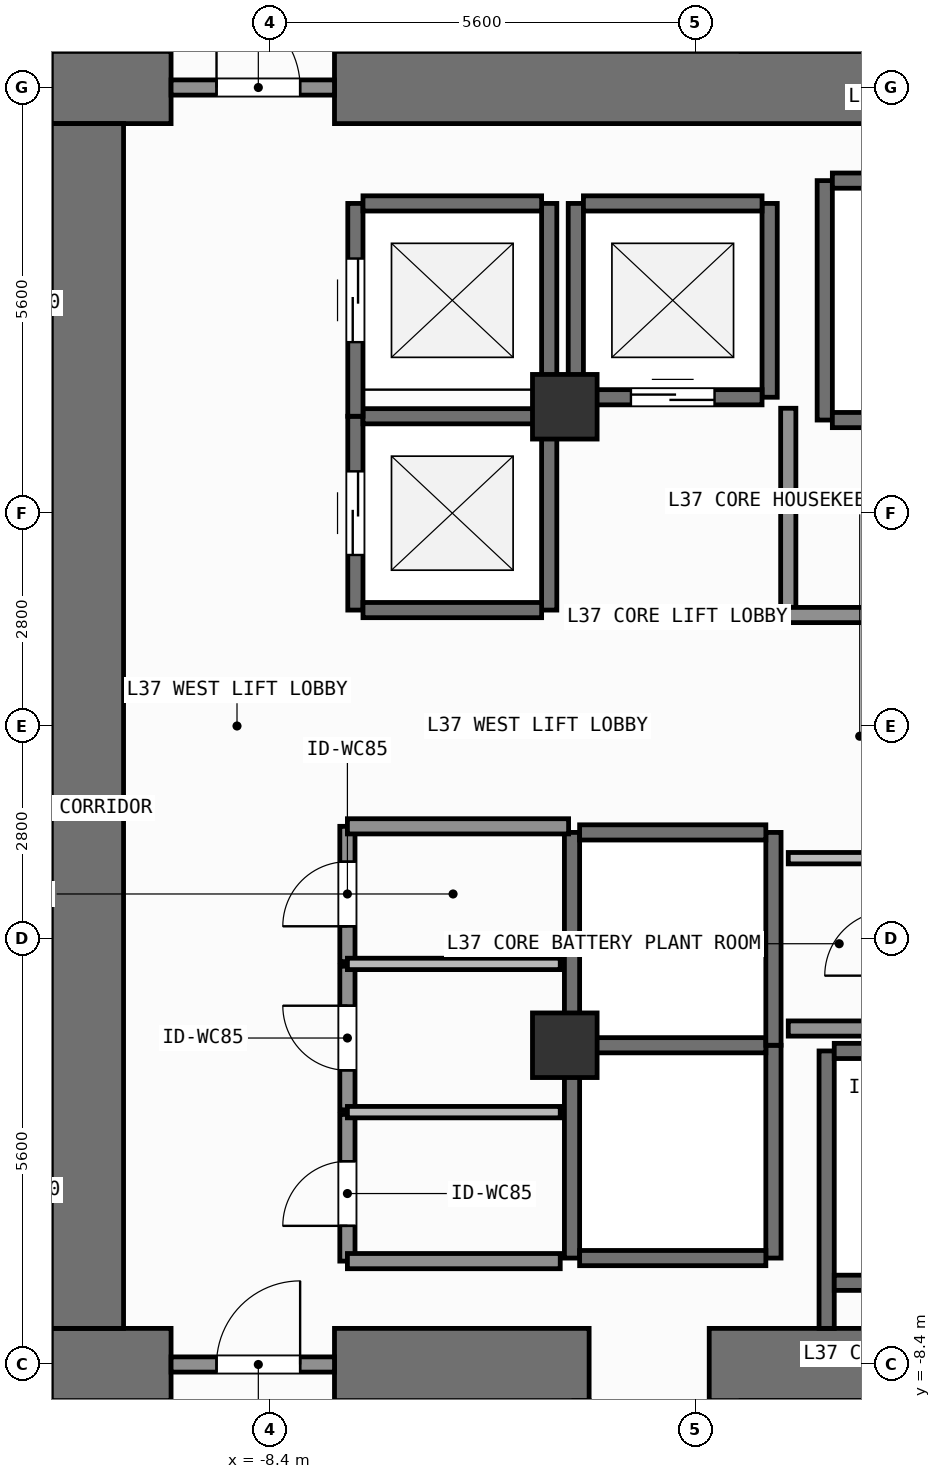
"""IFC4 building model, lengths in metres.
Left out: names, types, materials, properties, quantities, classifications, styles, units other than length and angle.
Written with IfcOpenShell. Run it as: python <this file> out.ifc"""

import sys

from ifc_helpers import new_model, si_unit, direction, frame, frame_2d, origin, origin_2d, place, context, subcontext, project, spatial, rectangle, extrude, element, fill, save


model = new_model("IFC4")
c1 = context("Model", 3, precision=1e-05, world=origin(), true_north=direction((0.0, 1.0)))
c2 = subcontext(c1, "Body", "Model", "MODEL_VIEW")
j1 = project(units=[si_unit("LENGTHUNIT", "METRE"), si_unit("PLANEANGLEUNIT", "RADIAN")], contexts=[c1])
p1 = place(None, origin())
s1 = spatial("IfcSite", under=j1, at=p1, CompositionType="ELEMENT")
p2 = place(p1, origin())
s2 = spatial("IfcBuilding", under=s1, at=p2, CompositionType="ELEMENT")
p3 = place(p2, frame((0.0, 0.0, 148.5)))
s3 = spatial("IfcBuildingStorey", under=s2, at=p3, CompositionType="ELEMENT", Elevation=148.5)
p4 = place(p3, frame((-11.275, -8.4, 0.0), z_axis=(0.0, 0.0, 1.0), x_axis=(1.0, 0.0, 0.0)))
e1 = element("IfcWall", 1, at=p4, inside=s3, PredefinedType="SHEAR", context=c2, shape_type="SweptSolid", body=[
    extrude(rectangle(XDim=1.575, YDim=0.95, at=frame_2d((0.788, 0.0))), origin(), (0.0, 0.0, 1.0), 3.9),
])
p5 = place(p3, frame((-7.55, -8.4, 0.0), z_axis=(0.0, 0.0, 1.0), x_axis=(1.0, 0.0, 0.0)))
e2 = element("IfcWall", 2, at=p5, inside=s3, PredefinedType="SHEAR", context=c2, shape_type="SweptSolid", body=[
    extrude(rectangle(XDim=3.35, YDim=0.95, at=frame_2d((1.675, 0.0))), origin(), (0.0, 0.0, 1.0), 3.9),
])
p6 = place(p3, frame((-2.62, -8.4, 0.0), z_axis=(0.0, 0.0, 1.0), x_axis=(1.0, 0.0, 0.0)))
e3 = element("IfcWall", 3, at=p6, inside=s3, PredefinedType="SHEAR", context=c2, shape_type="SweptSolid", body=[
    extrude(rectangle(XDim=7.27, YDim=0.95, at=frame_2d((3.635, 0.0))), origin(), (0.0, 0.0, 1.0), 3.9),
])
p7 = place(p3, frame((-11.275, 8.4, 0.0), z_axis=(0.0, 0.0, 1.0), x_axis=(1.0, 0.0, 0.0)))
e4 = element("IfcWall", 4, at=p7, inside=s3, PredefinedType="SHEAR", context=c2, shape_type="SweptSolid", body=[
    extrude(rectangle(XDim=1.575, YDim=0.95, at=frame_2d((0.788, 0.0))), origin(), (0.0, 0.0, 1.0), 3.9),
])
p8 = place(p3, frame((-7.55, 8.4, 0.0), z_axis=(0.0, 0.0, 1.0), x_axis=(1.0, 0.0, 0.0)))
e5 = element("IfcWall", 5, at=p8, inside=s3, PredefinedType="SHEAR", context=c2, shape_type="SweptSolid", body=[
    extrude(rectangle(XDim=16.425, YDim=0.95, at=frame_2d((8.212, 0.0))), origin(), (0.0, 0.0, 1.0), 3.9),
])
p9 = place(p3, frame((-10.8, -7.925, 0.0), z_axis=(0.0, 0.0, 1.0), x_axis=(0.0, 1.0, 0.0)))
e6 = element("IfcWall", 6, at=p9, inside=s3, PredefinedType="SHEAR", context=c2, shape_type="SweptSolid", body=[
    extrude(rectangle(XDim=15.85, YDim=0.95, at=frame_2d((7.925, 0.0))), origin(), (0.0, 0.0, 1.0), 3.9),
])
for number, where, z_axis, x_axis in (
    (7, (-4.52, -4.2, 0.0), (0.0, 0.0, 1.0), (1.0, 0.0, 0.0)),
    (8, (-4.52, 4.2, 0.0), (0.0, 0.0, 1.0), (1.0, 0.0, 0.0)),
):
    element("IfcColumn", number, at=place(p3, frame(where, z_axis=z_axis, x_axis=x_axis)), inside=s3, PredefinedType="COLUMN", context=c2, shape_type="SweptSolid", body=[
        extrude(rectangle(XDim=0.85, YDim=0.85, at=origin_2d()), origin(), (0.0, 0.0, 1.0), 3.9),
    ])
p10 = place(p3, frame((-7.275, 1.525, 0.0), z_axis=(0.0, 0.0, 1.0), x_axis=(0.0, 1.0, 0.0)))
e9 = element("IfcWall", 9, at=p10, inside=s3, PredefinedType="SHEAR", context=c2, shape_type="SweptSolid", body=[
    extrude(rectangle(XDim=2.55, YDim=0.2, at=frame_2d((1.275, 0.0))), origin(), (0.0, 0.0, 1.0), 3.68),
])
p11 = place(p10, frame((0.725, 0.0, 0.0)))
e10 = element("IfcOpeningElement", 10, at=p11, cuts=e9, PredefinedType="OPENING", context=c2, shape_type="SweptSolid", body=[
    extrude(rectangle(XDim=1.1, YDim=2.2, at=frame_2d((0.55, 1.1))), frame((0.0, 0.11, 0.0), z_axis=(0.0, -1.0, 0.0), x_axis=(1.0, 0.0, 0.0)), (0.0, 0.0, 1.0), 0.22),
])
p12 = place(p3, frame((-4.725, 1.525, 0.0), z_axis=(0.0, 0.0, 1.0), x_axis=(0.0, 1.0, 0.0)))
e11 = element("IfcWall", 11, at=p12, inside=s3, PredefinedType="SHEAR", context=c2, shape_type="SweptSolid", body=[
    extrude(rectangle(XDim=2.55, YDim=0.2, at=frame_2d((1.275, 0.0))), origin(), (0.0, 0.0, 1.0), 3.68),
])
for number, where, z_axis, x_axis in (
    (12, (-7.175, 1.525, 0.0), (0.0, 0.0, 1.0), (1.0, 0.0, 0.0)),
    (13, (-7.175, 4.075, 0.0), (0.0, 0.0, 1.0), (1.0, 0.0, 0.0)),
):
    element("IfcWall", number, at=place(p3, frame(where, z_axis=z_axis, x_axis=x_axis)), inside=s3, PredefinedType="SHEAR", context=c2, shape_type="SweptSolid", body=[
        extrude(rectangle(XDim=2.35, YDim=0.2, at=frame_2d((1.175, 0.0))), origin(), (0.0, 0.0, 1.0), 3.68),
    ])
p13 = place(p3, frame((-7.275, 4.075, 0.0), z_axis=(0.0, 0.0, 1.0), x_axis=(0.0, 1.0, 0.0)))
e14 = element("IfcWall", 14, at=p13, inside=s3, PredefinedType="SHEAR", context=c2, shape_type="SweptSolid", body=[
    extrude(rectangle(XDim=2.8, YDim=0.2, at=frame_2d((1.4, 0.0))), origin(), (0.0, 0.0, 1.0), 3.68),
])
p14 = place(p13, frame((0.975, 0.0, 0.0)))
e15 = element("IfcOpeningElement", 15, at=p14, cuts=e14, PredefinedType="OPENING", context=c2, shape_type="SweptSolid", body=[
    extrude(rectangle(XDim=1.1, YDim=2.2, at=frame_2d((0.55, 1.1))), frame((0.0, 0.11, 0.0), z_axis=(0.0, -1.0, 0.0), x_axis=(1.0, 0.0, 0.0)), (0.0, 0.0, 1.0), 0.22),
])
p15 = place(p3, frame((-4.725, 4.075, 0.0), z_axis=(0.0, 0.0, 1.0), x_axis=(0.0, 1.0, 0.0)))
e16 = element("IfcWall", 16, at=p15, inside=s3, PredefinedType="SHEAR", context=c2, shape_type="SweptSolid", body=[
    extrude(rectangle(XDim=2.8, YDim=0.2, at=frame_2d((1.4, 0.0))), origin(), (0.0, 0.0, 1.0), 3.68),
])
p16 = place(p3, frame((-7.175, 6.875, 0.0), z_axis=(0.0, 0.0, 1.0), x_axis=(1.0, 0.0, 0.0)))
e17 = element("IfcWall", 17, at=p16, inside=s3, PredefinedType="SHEAR", context=c2, shape_type="SweptSolid", body=[
    extrude(rectangle(XDim=2.35, YDim=0.2, at=frame_2d((1.175, 0.0))), origin(), (0.0, 0.0, 1.0), 3.68),
])
for number, where, z_axis, x_axis in (
    (18, (-4.375, 4.325, 0.0), (0.0, 0.0, 1.0), (0.0, 1.0, 0.0)),
    (19, (-1.825, 4.325, 0.0), (0.0, 0.0, 1.0), (0.0, 1.0, 0.0)),
):
    element("IfcWall", number, at=place(p3, frame(where, z_axis=z_axis, x_axis=x_axis)), inside=s3, PredefinedType="SHEAR", context=c2, shape_type="SweptSolid", body=[
        extrude(rectangle(XDim=2.55, YDim=0.2, at=frame_2d((1.275, 0.0))), origin(), (0.0, 0.0, 1.0), 3.68),
    ])
p17 = place(p3, frame((-4.275, 4.325, 0.0), z_axis=(0.0, 0.0, 1.0), x_axis=(1.0, 0.0, 0.0)))
e20 = element("IfcWall", 20, at=p17, inside=s3, PredefinedType="SHEAR", context=c2, shape_type="SweptSolid", body=[
    extrude(rectangle(XDim=2.35, YDim=0.2, at=frame_2d((1.175, 0.0))), origin(), (0.0, 0.0, 1.0), 3.68),
])
p18 = place(p17, frame((0.625, 0.0, 0.0)))
e21 = element("IfcOpeningElement", 21, at=p18, cuts=e20, PredefinedType="OPENING", context=c2, shape_type="SweptSolid", body=[
    extrude(rectangle(XDim=1.1, YDim=2.2, at=frame_2d((0.55, 1.1))), frame((0.0, 0.11, 0.0), z_axis=(0.0, -1.0, 0.0), x_axis=(1.0, 0.0, 0.0)), (0.0, 0.0, 1.0), 0.22),
])
p19 = place(p3, frame((-4.275, 6.875, 0.0), z_axis=(0.0, 0.0, 1.0), x_axis=(1.0, 0.0, 0.0)))
e22 = element("IfcWall", 22, at=p19, inside=s3, PredefinedType="SHEAR", context=c2, shape_type="SweptSolid", body=[
    extrude(rectangle(XDim=2.35, YDim=0.2, at=frame_2d((1.175, 0.0))), origin(), (0.0, 0.0, 1.0), 3.68),
])
for number, where, z_axis, x_axis in (
    (23, (-4.425, -7.0, 0.0), (0.0, 0.0, 1.0), (0.0, 1.0, 0.0)),
    (24, (-1.775, -7.0, 0.0), (0.0, 0.0, 1.0), (0.0, 1.0, 0.0)),
):
    element("IfcWall", number, at=place(p3, frame(where, z_axis=z_axis, x_axis=x_axis)), inside=s3, PredefinedType="SHEAR", context=c2, shape_type="SweptSolid", body=[
        extrude(rectangle(XDim=2.8, YDim=0.2, at=frame_2d((1.4, 0.0))), origin(), (0.0, 0.0, 1.0), 3.68),
    ])
for number, where, z_axis, x_axis in (
    (25, (-4.325, -7.0, 0.0), (0.0, 0.0, 1.0), (1.0, 0.0, 0.0)),
    (26, (-4.325, -4.2, 0.0), (0.0, 0.0, 1.0), (1.0, 0.0, 0.0)),
):
    element("IfcWall", number, at=place(p3, frame(where, z_axis=z_axis, x_axis=x_axis)), inside=s3, PredefinedType="SHEAR", context=c2, shape_type="SweptSolid", body=[
        extrude(rectangle(XDim=2.45, YDim=0.2, at=frame_2d((1.225, 0.0))), origin(), (0.0, 0.0, 1.0), 3.68),
    ])
for number, where, z_axis, x_axis in (
    (27, (-4.425, -4.2, 0.0), (0.0, 0.0, 1.0), (0.0, 1.0, 0.0)),
    (28, (-1.775, -4.2, 0.0), (0.0, 0.0, 1.0), (0.0, 1.0, 0.0)),
):
    element("IfcWall", number, at=place(p3, frame(where, z_axis=z_axis, x_axis=x_axis)), inside=s3, PredefinedType="SHEAR", context=c2, shape_type="SweptSolid", body=[
        extrude(rectangle(XDim=2.8, YDim=0.2, at=frame_2d((1.4, 0.0))), origin(), (0.0, 0.0, 1.0), 3.68),
    ])
p20 = place(p3, frame((-4.325, -1.4, 0.0), z_axis=(0.0, 0.0, 1.0), x_axis=(1.0, 0.0, 0.0)))
e29 = element("IfcWall", 29, at=p20, inside=s3, PredefinedType="SHEAR", context=c2, shape_type="SweptSolid", body=[
    extrude(rectangle(XDim=2.45, YDim=0.2, at=frame_2d((1.225, 0.0))), origin(), (0.0, 0.0, 1.0), 3.68),
])
p21 = place(p3, frame((-1.1, 4.025, 0.0), z_axis=(0.0, 0.0, 1.0), x_axis=(0.0, 1.0, 0.0)))
e30 = element("IfcWall", 30, at=p21, inside=s3, PredefinedType="SHEAR", context=c2, shape_type="SweptSolid", body=[
    extrude(rectangle(XDim=3.15, YDim=0.2, at=frame_2d((1.575, 0.0))), origin(), (0.0, 0.0, 1.0), 3.68),
])
for number, where, z_axis, x_axis in (
    (31, (-1.0, 4.025, 0.0), (0.0, 0.0, 1.0), (1.0, 0.0, 0.0)),
    (32, (-1.0, 7.175, 0.0), (0.0, 0.0, 1.0), (1.0, 0.0, 0.0)),
):
    element("IfcWall", number, at=place(p3, frame(where, z_axis=z_axis, x_axis=x_axis)), inside=s3, PredefinedType="SHEAR", context=c2, shape_type="SweptSolid", body=[
        extrude(rectangle(XDim=2.4, YDim=0.2, at=frame_2d((1.2, 0.0))), origin(), (0.0, 0.0, 1.0), 3.68),
    ])
p22 = place(p3, frame((-1.075, -7.925, 0.0), z_axis=(0.0, 0.0, 1.0), x_axis=(0.0, 1.0, 0.0)))
e33 = element("IfcWall", 33, at=p22, inside=s3, PredefinedType="SHEAR", context=c2, shape_type="SweptSolid", body=[
    extrude(rectangle(XDim=3.65, YDim=0.2, at=frame_2d((1.825, 0.0))), origin(), (0.0, 0.0, 1.0), 3.68),
])
for number, where, z_axis, x_axis in (
    (34, (-0.975, -7.325, 0.0), (0.0, 0.0, 1.0), (1.0, 0.0, 0.0)),
    (35, (-0.975, -4.275, 0.0), (0.0, 0.0, 1.0), (1.0, 0.0, 0.0)),
):
    element("IfcWall", number, at=place(p3, frame(where, z_axis=z_axis, x_axis=x_axis)), inside=s3, PredefinedType="SHEAR", context=c2, shape_type="SweptSolid", body=[
        extrude(rectangle(XDim=2.35, YDim=0.2, at=frame_2d((1.175, 0.0))), origin(), (0.0, 0.0, 1.0), 3.68),
    ])
p23 = place(p3, frame((-9.7, -8.4, 0.0), z_axis=(0.0, 0.0, 1.0), x_axis=(1.0, 0.0, 0.0)))
e36 = element("IfcWall", 36, at=p23, inside=s3, PredefinedType="SOLIDWALL", context=c2, shape_type="SweptSolid", body=[
    extrude(rectangle(XDim=2.15, YDim=0.2, at=frame_2d((1.075, 0.0))), origin(), (0.0, 0.0, 1.0), 2.72),
])
p24 = place(p23, frame((0.598, 0.0, 0.0)))
e37 = element("IfcOpeningElement", 37, at=p24, cuts=e36, PredefinedType="OPENING", context=c2, shape_type="SweptSolid", body=[
    extrude(rectangle(XDim=1.1, YDim=2.15, at=frame_2d((0.55, 1.075))), frame((0.0, 0.11, 0.0), z_axis=(0.0, -1.0, 0.0), x_axis=(1.0, 0.0, 0.0)), (0.0, 0.0, 1.0), 0.22),
])
p25 = place(p3, frame((-9.7, 8.4, 0.0), z_axis=(0.0, 0.0, 1.0), x_axis=(1.0, 0.0, 0.0)))
e38 = element("IfcWall", 38, at=p25, inside=s3, PredefinedType="SOLIDWALL", context=c2, shape_type="SweptSolid", body=[
    extrude(rectangle(XDim=2.15, YDim=0.2, at=frame_2d((1.075, 0.0))), origin(), (0.0, 0.0, 1.0), 2.72),
])
p26 = place(p25, frame((0.598, 0.0, 0.0)))
e39 = element("IfcOpeningElement", 39, at=p26, cuts=e38, PredefinedType="OPENING", context=c2, shape_type="SweptSolid", body=[
    extrude(rectangle(XDim=1.1, YDim=2.15, at=frame_2d((0.55, 1.075))), frame((0.0, 0.11, 0.0), z_axis=(0.0, -1.0, 0.0), x_axis=(1.0, 0.0, 0.0)), (0.0, 0.0, 1.0), 0.22),
])
p27 = place(p3, frame((-7.38, -7.04, 0.0), z_axis=(0.0, 0.0, 1.0), x_axis=(0.0, 1.0, 0.0)))
e40 = element("IfcWall", 40, at=p27, inside=s3, PredefinedType="SOLIDWALL", context=c2, shape_type="SweptSolid", body=[
    extrude(rectangle(XDim=1.93, YDim=0.2, at=frame_2d((0.965, 0.0))), origin(), (0.0, 0.0, 1.0), 3.68),
])
p28 = place(p27, frame((0.464, 0.0, 0.0)))
e41 = element("IfcOpeningElement", 41, at=p28, cuts=e40, PredefinedType="OPENING", context=c2, shape_type="SweptSolid", body=[
    extrude(rectangle(XDim=0.85, YDim=2.1, at=frame_2d((0.425, 1.05))), frame((0.0, 0.11, 0.0), z_axis=(0.0, -1.0, 0.0), x_axis=(1.0, 0.0, 0.0)), (0.0, 0.0, 1.0), 0.22),
])
p29 = place(p3, frame((-7.38, -5.05, 0.0), z_axis=(0.0, 0.0, 1.0), x_axis=(0.0, 1.0, 0.0)))
e42 = element("IfcWall", 42, at=p29, inside=s3, PredefinedType="SOLIDWALL", context=c2, shape_type="SweptSolid", body=[
    extrude(rectangle(XDim=1.89, YDim=0.2, at=frame_2d((0.945, 0.0))), origin(), (0.0, 0.0, 1.0), 3.68),
])
p30 = place(p29, frame((0.52, 0.0, 0.0)))
e43 = element("IfcOpeningElement", 43, at=p30, cuts=e42, PredefinedType="OPENING", context=c2, shape_type="SweptSolid", body=[
    extrude(rectangle(XDim=0.85, YDim=2.1, at=frame_2d((0.425, 1.05))), frame((0.0, 0.11, 0.0), z_axis=(0.0, -1.0, 0.0), x_axis=(1.0, 0.0, 0.0)), (0.0, 0.0, 1.0), 0.22),
])
p31 = place(p3, frame((-7.38, -3.1, 0.0), z_axis=(0.0, 0.0, 1.0), x_axis=(0.0, 1.0, 0.0)))
e44 = element("IfcWall", 44, at=p31, inside=s3, PredefinedType="SOLIDWALL", context=c2, shape_type="SweptSolid", body=[
    extrude(rectangle(XDim=1.78, YDim=0.2, at=frame_2d((0.89, 0.0))), origin(), (0.0, 0.0, 1.0), 3.68),
])
p32 = place(p31, frame((0.465, 0.0, 0.0)))
e45 = element("IfcOpeningElement", 45, at=p32, cuts=e44, PredefinedType="OPENING", context=c2, shape_type="SweptSolid", body=[
    extrude(rectangle(XDim=0.85, YDim=2.1, at=frame_2d((0.425, 1.05))), frame((0.0, 0.11, 0.0), z_axis=(0.0, -1.0, 0.0), x_axis=(1.0, 0.0, 0.0)), (0.0, 0.0, 1.0), 0.22),
])
p33 = place(p3, frame((-7.38, -1.32, 0.0), z_axis=(0.0, 0.0, 1.0), x_axis=(1.0, 0.0, 0.0)))
e46 = element("IfcWall", 46, at=p33, inside=s3, PredefinedType="SOLIDWALL", context=c2, shape_type="SweptSolid", body=[
    extrude(rectangle(XDim=2.91, YDim=0.2, at=frame_2d((1.455, 0.0))), origin(), (0.0, 0.0, 1.0), 3.68),
])
p34 = place(p3, frame((-1.58, 1.48, 0.0), z_axis=(0.0, 0.0, 1.0), x_axis=(0.0, 1.0, 0.0)))
e47 = element("IfcWall", 47, at=p34, inside=s3, PredefinedType="SOLIDWALL", context=c2, shape_type="SweptSolid", body=[
    extrude(rectangle(XDim=2.7, YDim=0.2, at=frame_2d((1.35, 0.0))), origin(), (0.0, 0.0, 1.0), 3.68),
])
for number, where, z_axis, x_axis in (
    (48, (-1.58, -3.98, 0.0), (0.0, 0.0, 1.0), (1.0, 0.0, 0.0)),
    (49, (-1.58, 1.46, 0.0), (0.0, 0.0, 1.0), (1.0, 0.0, 0.0)),
):
    element("IfcWall", number, at=place(p3, frame(where, z_axis=z_axis, x_axis=x_axis)), inside=s3, PredefinedType="SOLIDWALL", context=c2, shape_type="SweptSolid", body=[
        extrude(rectangle(XDim=3.19, YDim=0.2, at=frame_2d((1.595, 0.0))), origin(), (0.0, 0.0, 1.0), 3.68),
    ])
p35 = place(p3, frame((-1.58, -1.739, 0.0), z_axis=(0.0, 0.0, 1.0), x_axis=(1.0, 0.0, 0.0)))
e50 = element("IfcWall", 50, at=p35, inside=s3, PredefinedType="PARTITIONING", context=c2, shape_type="SweptSolid", body=[
    extrude(rectangle(XDim=3.19, YDim=0.15, at=frame_2d((1.595, 0.0))), origin(), (0.0, 0.0, 1.0), 3.68),
])
p36 = place(p3, frame((-7.38, -7.04, 0.0), z_axis=(0.0, 0.0, 1.0), x_axis=(1.0, 0.0, 0.0)))
e51 = element("IfcWall", 51, at=p36, inside=s3, PredefinedType="SOLIDWALL", context=c2, shape_type="SweptSolid", body=[
    extrude(rectangle(XDim=2.8, YDim=0.2, at=frame_2d((1.4, 0.0))), origin(), (0.0, 0.0, 1.0), 3.68),
])
for number, where, z_axis, x_axis in (
    (52, (-7.38, -5.08, 0.0), (0.0, 0.0, 1.0), (1.0, 0.0, 0.0)),
    (53, (-7.38, -3.13, 0.0), (0.0, 0.0, 1.0), (1.0, 0.0, 0.0)),
):
    element("IfcWall", number, at=place(p3, frame(where, z_axis=z_axis, x_axis=x_axis)), inside=s3, PredefinedType="PARTITIONING", context=c2, shape_type="SweptSolid", body=[
        extrude(rectangle(XDim=2.8, YDim=0.15, at=frame_2d((1.4, 0.0))), origin(), (0.0, 0.0, 1.0), 3.68),
    ])
p37 = place(p11, origin())
e54 = element("IfcDoor", 54, at=p37, inside=s3, OperationType="SLIDING_TO_LEFT", PredefinedType="DOOR", context=c2, shape_type="SweptSolid", body=[
    extrude(rectangle(XDim=1.1, YDim=2.2, at=frame_2d((0.55, 1.1))), frame((0.0, 0.025, 0.0), z_axis=(0.0, -1.0, 0.0), x_axis=(1.0, 0.0, 0.0)), (0.0, 0.0, 1.0), 0.05),
])
fill(e10, e54)
p38 = place(p14, origin())
e55 = element("IfcDoor", 55, at=p38, inside=s3, OperationType="SLIDING_TO_LEFT", PredefinedType="DOOR", context=c2, shape_type="SweptSolid", body=[
    extrude(rectangle(XDim=1.1, YDim=2.2, at=frame_2d((0.55, 1.1))), frame((0.0, 0.025, 0.0), z_axis=(0.0, -1.0, 0.0), x_axis=(1.0, 0.0, 0.0)), (0.0, 0.0, 1.0), 0.05),
])
fill(e15, e55)
p39 = place(p18, origin())
e56 = element("IfcDoor", 56, at=p39, inside=s3, OperationType="SLIDING_TO_LEFT", PredefinedType="DOOR", context=c2, shape_type="SweptSolid", body=[
    extrude(rectangle(XDim=1.1, YDim=2.2, at=frame_2d((0.55, 1.1))), frame((0.0, 0.025, 0.0), z_axis=(0.0, -1.0, 0.0), x_axis=(1.0, 0.0, 0.0)), (0.0, 0.0, 1.0), 0.05),
])
fill(e21, e56)
p40 = place(p24, origin())
e57 = element("IfcDoor", 57, at=p40, inside=s3, OperationType="SINGLE_SWING_RIGHT", PredefinedType="DOOR", context=c2, shape_type="SweptSolid", body=[
    extrude(rectangle(XDim=1.1, YDim=2.15, at=frame_2d((0.55, 1.075))), frame((0.0, 0.025, 0.0), z_axis=(0.0, -1.0, 0.0), x_axis=(1.0, 0.0, 0.0)), (0.0, 0.0, 1.0), 0.05),
])
fill(e37, e57)
p41 = place(p26, origin())
e58 = element("IfcDoor", 58, at=p41, inside=s3, OperationType="SINGLE_SWING_LEFT", PredefinedType="DOOR", context=c2, shape_type="SweptSolid", body=[
    extrude(rectangle(XDim=1.1, YDim=2.15, at=frame_2d((0.55, 1.075))), frame((0.0, 0.025, 0.0), z_axis=(0.0, -1.0, 0.0), x_axis=(1.0, 0.0, 0.0)), (0.0, 0.0, 1.0), 0.05),
])
fill(e39, e58)
p42 = place(p28, origin())
e59 = element("IfcDoor", 59, at=p42, inside=s3, OperationType="SINGLE_SWING_LEFT", PredefinedType="DOOR", context=c2, shape_type="SweptSolid", body=[
    extrude(rectangle(XDim=0.85, YDim=2.1, at=frame_2d((0.425, 1.05))), frame((0.0, 0.025, 0.0), z_axis=(0.0, -1.0, 0.0), x_axis=(1.0, 0.0, 0.0)), (0.0, 0.0, 1.0), 0.05),
])
fill(e41, e59)
p43 = place(p30, origin())
e60 = element("IfcDoor", 60, at=p43, inside=s3, OperationType="SINGLE_SWING_RIGHT", PredefinedType="DOOR", context=c2, shape_type="SweptSolid", body=[
    extrude(rectangle(XDim=0.85, YDim=2.1, at=frame_2d((0.425, 1.05))), frame((0.0, 0.025, 0.0), z_axis=(0.0, -1.0, 0.0), x_axis=(1.0, 0.0, 0.0)), (0.0, 0.0, 1.0), 0.05),
])
fill(e43, e60)
p44 = place(p32, origin())
e61 = element("IfcDoor", 61, at=p44, inside=s3, OperationType="SINGLE_SWING_LEFT", PredefinedType="DOOR", context=c2, shape_type="SweptSolid", body=[
    extrude(rectangle(XDim=0.85, YDim=2.1, at=frame_2d((0.425, 1.05))), frame((0.0, 0.025, 0.0), z_axis=(0.0, -1.0, 0.0), x_axis=(1.0, 0.0, 0.0)), (0.0, 0.0, 1.0), 0.05),
])
fill(e45, e61)
save(model, sys.argv[1])
